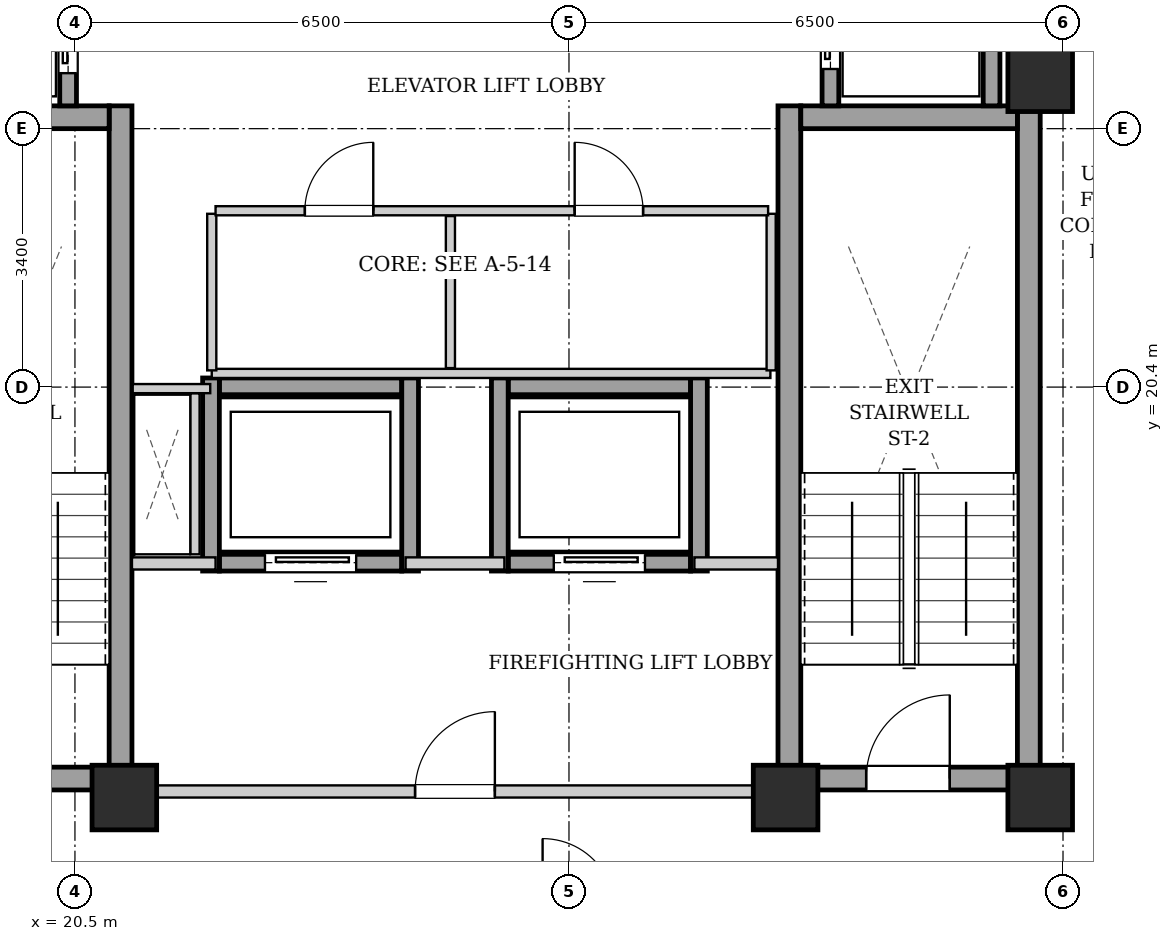
"""IFC4 building model, lengths in metres.
Left out: names, types, materials, properties, quantities, classifications, styles, units other than length and angle.
Written with IfcOpenShell. Run it as: python <this file> out.ifc"""

import sys

from ifc_helpers import new_model, si_unit, direction, frame, frame_2d, origin, origin_2d, place, context, subcontext, project, spatial, rectangle, extrude, element, fill, save


model = new_model("IFC4")
c1 = context("Model", 3, precision=1e-05, world=origin(), true_north=direction((0.0, 1.0)))
c2 = subcontext(c1, "Body", "Model", "MODEL_VIEW")
j1 = project(units=[si_unit("LENGTHUNIT", "METRE"), si_unit("PLANEANGLEUNIT", "RADIAN")], contexts=[c1])
p1 = place(None, origin())
s1 = spatial("IfcSite", under=j1, at=p1, CompositionType="ELEMENT")
p2 = place(p1, origin())
s2 = spatial("IfcBuilding", under=s1, at=p2, CompositionType="ELEMENT")
p3 = place(p2, frame((0.0, 0.0, 210.7)))
s3 = spatial("IfcBuildingStorey", under=s2, at=p3, CompositionType="ELEMENT", Elevation=210.7)
for number, where, z_axis, x_axis in (
    (1, (21.15, 15.0, 0.0), (0.0, 0.0, 1.0), (1.0, 0.0, 0.0)),
    (2, (29.85, 15.0, 0.0), (0.0, 0.0, 1.0), (1.0, 0.0, 0.0)),
    (3, (33.2, 15.0, 0.0), (0.0, 0.0, 1.0), (1.0, 0.0, 0.0)),
    (4, (33.2, 24.45, 0.0), (0.0, 0.0, 1.0), (1.0, 0.0, 0.0)),
):
    element("IfcColumn", number, at=place(p3, frame(where, z_axis=z_axis, x_axis=x_axis)), inside=s3, PredefinedType="COLUMN", context=c2, shape_type="SweptSolid", body=[
        extrude(rectangle(XDim=0.85, YDim=0.85, at=origin_2d()), origin(), (0.0, 0.0, 1.0), 3.3),
    ])
p4 = place(p3, frame((21.1, 15.1, 0.0), z_axis=(0.0, 0.0, 1.0), x_axis=(0.0, 1.0, 0.0)))
e5 = element("IfcWall", 5, at=p4, inside=s3, PredefinedType="SHEAR", context=c2, shape_type="SweptSolid", body=[
    extrude(rectangle(XDim=9.0, YDim=0.3, at=frame_2d((4.5, 0.0))), origin(), (0.0, 0.0, 1.0), 3.04),
])
p5 = place(p3, frame((18.1, 23.95, 0.0), z_axis=(0.0, 0.0, 1.0), x_axis=(1.0, 0.0, 0.0)))
e6 = element("IfcWall", 6, at=p5, inside=s3, PredefinedType="SHEAR", context=c2, shape_type="SweptSolid", body=[
    extrude(rectangle(XDim=2.85, YDim=0.3, at=frame_2d((1.425, 0.0))), origin(), (0.0, 0.0, 1.0), 3.04),
])
p6 = place(p3, frame((18.1, 15.25, 0.0), z_axis=(0.0, 0.0, 1.0), x_axis=(1.0, 0.0, 0.0)))
e7 = element("IfcWall", 7, at=p6, inside=s3, PredefinedType="SHEAR", context=c2, shape_type="SweptSolid", body=[
    extrude(rectangle(XDim=2.85, YDim=0.3, at=frame_2d((1.425, 0.0))), origin(), (0.0, 0.0, 1.0), 3.04),
])
p7 = place(p6, frame((0.86, 0.0, 0.0)))
e8 = element("IfcOpeningElement", 8, at=p7, cuts=e7, PredefinedType="OPENING", context=c2, shape_type="SweptSolid", body=[
    extrude(rectangle(XDim=1.1, YDim=2.05, at=frame_2d((0.55, 1.025))), frame((0.0, 0.16, 0.0), z_axis=(0.0, -1.0, 0.0), x_axis=(1.0, 0.0, 0.0)), (0.0, 0.0, 1.0), 0.32),
])
for number, where, z_axis, x_axis in (
    (9, (29.9, 15.1, 0.0), (0.0, 0.0, 1.0), (0.0, 1.0, 0.0)),
    (10, (33.05, 15.1, 0.0), (0.0, 0.0, 1.0), (0.0, 1.0, 0.0)),
):
    element("IfcWall", number, at=place(p3, frame(where, z_axis=z_axis, x_axis=x_axis)), inside=s3, PredefinedType="SHEAR", context=c2, shape_type="SweptSolid", body=[
        extrude(rectangle(XDim=9.0, YDim=0.3, at=frame_2d((4.5, 0.0))), origin(), (0.0, 0.0, 1.0), 3.04),
    ])
p8 = place(p3, frame((30.05, 23.95, 0.0), z_axis=(0.0, 0.0, 1.0), x_axis=(1.0, 0.0, 0.0)))
e11 = element("IfcWall", 11, at=p8, inside=s3, PredefinedType="SHEAR", context=c2, shape_type="SweptSolid", body=[
    extrude(rectangle(XDim=2.85, YDim=0.3, at=frame_2d((1.425, 0.0))), origin(), (0.0, 0.0, 1.0), 3.04),
])
p9 = place(p3, frame((30.05, 15.25, 0.0), z_axis=(0.0, 0.0, 1.0), x_axis=(1.0, 0.0, 0.0)))
e12 = element("IfcWall", 12, at=p9, inside=s3, PredefinedType="SHEAR", context=c2, shape_type="SweptSolid", body=[
    extrude(rectangle(XDim=2.85, YDim=0.3, at=frame_2d((1.425, 0.0))), origin(), (0.0, 0.0, 1.0), 3.04),
])
p10 = place(p9, frame((0.86, 0.0, 0.0)))
e13 = element("IfcOpeningElement", 13, at=p10, cuts=e12, PredefinedType="OPENING", context=c2, shape_type="SweptSolid", body=[
    extrude(rectangle(XDim=1.1, YDim=2.05, at=frame_2d((0.55, 1.025))), frame((0.0, 0.16, 0.0), z_axis=(0.0, -1.0, 0.0), x_axis=(1.0, 0.0, 0.0)), (0.0, 0.0, 1.0), 0.32),
])
p11 = place(p3, frame((20.41, 24.1, 0.0), z_axis=(0.0, 0.0, 1.0), x_axis=(0.0, 1.0, 0.0)))
e14 = element("IfcWall", 14, at=p11, inside=s3, PredefinedType="SHEAR", context=c2, shape_type="SweptSolid", body=[
    extrude(rectangle(XDim=1.96, YDim=0.22, at=frame_2d((0.98, 0.0))), origin(), (0.0, 0.0, 1.0), 3.04),
])
p12 = place(p11, frame((0.43, 0.0, 0.0)))
e15 = element("IfcOpeningElement", 15, at=p12, cuts=e14, PredefinedType="OPENING", context=c2, shape_type="SweptSolid", body=[
    extrude(rectangle(XDim=1.1, YDim=2.15, at=frame_2d((0.55, 1.075))), frame((0.0, 0.12, 0.0), z_axis=(0.0, -1.0, 0.0), x_axis=(1.0, 0.0, 0.0)), (0.0, 0.0, 1.0), 0.24),
])
p13 = place(p3, frame((30.44, 24.1, 0.0), z_axis=(0.0, 0.0, 1.0), x_axis=(0.0, 1.0, 0.0)))
e16 = element("IfcWall", 16, at=p13, inside=s3, PredefinedType="SHEAR", context=c2, shape_type="SweptSolid", body=[
    extrude(rectangle(XDim=2.07, YDim=0.22, at=frame_2d((1.035, 0.0))), origin(), (0.0, 0.0, 1.0), 3.04),
])
p14 = place(p13, frame((0.485, 0.0, 0.0)))
e17 = element("IfcOpeningElement", 17, at=p14, cuts=e16, PredefinedType="OPENING", context=c2, shape_type="SweptSolid", body=[
    extrude(rectangle(XDim=1.1, YDim=2.15, at=frame_2d((0.55, 1.075))), frame((0.0, 0.12, 0.0), z_axis=(0.0, -1.0, 0.0), x_axis=(1.0, 0.0, 0.0)), (0.0, 0.0, 1.0), 0.24),
])
p15 = place(p3, frame((32.56, 24.1, 0.0), z_axis=(0.0, 0.0, 1.0), x_axis=(0.0, 1.0, 0.0)))
e18 = element("IfcWall", 18, at=p15, inside=s3, PredefinedType="SHEAR", context=c2, shape_type="SweptSolid", body=[
    extrude(rectangle(XDim=2.07, YDim=0.22, at=frame_2d((1.035, 0.0))), origin(), (0.0, 0.0, 1.0), 3.04),
])
p16 = place(p3, frame((22.4, 18.09, 0.0), z_axis=(0.0, 0.0, 1.0), x_axis=(1.0, 0.0, 0.0)))
e19 = element("IfcWall", 19, at=p16, inside=s3, PredefinedType="SHEAR", context=c2, shape_type="SweptSolid", body=[
    extrude(rectangle(XDim=2.4, YDim=0.22, at=frame_2d((1.2, 0.0))), origin(), (0.0, 0.0, 1.0), 3.04),
])
p17 = place(p16, frame((0.6, 0.0, 0.0)))
e20 = element("IfcOpeningElement", 20, at=p17, cuts=e19, PredefinedType="OPENING", context=c2, shape_type="SweptSolid", body=[
    extrude(rectangle(XDim=1.2, YDim=2.15, at=frame_2d((0.6, 1.075))), frame((0.0, 0.12, 0.0), z_axis=(0.0, -1.0, 0.0), x_axis=(1.0, 0.0, 0.0)), (0.0, 0.0, 1.0), 0.24),
])
p18 = place(p3, frame((22.4, 20.41, 0.0), z_axis=(0.0, 0.0, 1.0), x_axis=(1.0, 0.0, 0.0)))
e21 = element("IfcWall", 21, at=p18, inside=s3, PredefinedType="SHEAR", context=c2, shape_type="SweptSolid", body=[
    extrude(rectangle(XDim=2.4, YDim=0.22, at=frame_2d((1.2, 0.0))), origin(), (0.0, 0.0, 1.0), 3.04),
])
for number, where, z_axis, x_axis in (
    (22, (22.29, 17.98, 0.0), (0.0, 0.0, 1.0), (0.0, 1.0, 0.0)),
    (23, (24.91, 17.98, 0.0), (0.0, 0.0, 1.0), (0.0, 1.0, 0.0)),
):
    element("IfcWall", number, at=place(p3, frame(where, z_axis=z_axis, x_axis=x_axis)), inside=s3, PredefinedType="SHEAR", context=c2, shape_type="SweptSolid", body=[
        extrude(rectangle(XDim=2.54, YDim=0.22, at=frame_2d((1.27, 0.0))), origin(), (0.0, 0.0, 1.0), 3.04),
    ])
p19 = place(p3, frame((26.2, 18.09, 0.0), z_axis=(0.0, 0.0, 1.0), x_axis=(1.0, 0.0, 0.0)))
e24 = element("IfcWall", 24, at=p19, inside=s3, PredefinedType="SHEAR", context=c2, shape_type="SweptSolid", body=[
    extrude(rectangle(XDim=2.4, YDim=0.22, at=frame_2d((1.2, 0.0))), origin(), (0.0, 0.0, 1.0), 3.04),
])
p20 = place(p19, frame((0.6, 0.0, 0.0)))
e25 = element("IfcOpeningElement", 25, at=p20, cuts=e24, PredefinedType="OPENING", context=c2, shape_type="SweptSolid", body=[
    extrude(rectangle(XDim=1.2, YDim=2.15, at=frame_2d((0.6, 1.075))), frame((0.0, 0.12, 0.0), z_axis=(0.0, -1.0, 0.0), x_axis=(1.0, 0.0, 0.0)), (0.0, 0.0, 1.0), 0.24),
])
p21 = place(p3, frame((26.2, 20.41, 0.0), z_axis=(0.0, 0.0, 1.0), x_axis=(1.0, 0.0, 0.0)))
e26 = element("IfcWall", 26, at=p21, inside=s3, PredefinedType="SHEAR", context=c2, shape_type="SweptSolid", body=[
    extrude(rectangle(XDim=2.4, YDim=0.22, at=frame_2d((1.2, 0.0))), origin(), (0.0, 0.0, 1.0), 3.04),
])
for number, where, z_axis, x_axis in (
    (27, (26.09, 17.98, 0.0), (0.0, 0.0, 1.0), (0.0, 1.0, 0.0)),
    (28, (28.71, 17.98, 0.0), (0.0, 0.0, 1.0), (0.0, 1.0, 0.0)),
):
    element("IfcWall", number, at=place(p3, frame(where, z_axis=z_axis, x_axis=x_axis)), inside=s3, PredefinedType="SHEAR", context=c2, shape_type="SweptSolid", body=[
        extrude(rectangle(XDim=2.54, YDim=0.22, at=frame_2d((1.27, 0.0))), origin(), (0.0, 0.0, 1.0), 3.04),
    ])
p22 = place(p3, frame((21.25, 15.08, 0.0), z_axis=(0.0, 0.0, 1.0), x_axis=(1.0, 0.0, 0.0)))
e29 = element("IfcWall", 29, at=p22, inside=s3, PredefinedType="PARTITIONING", context=c2, shape_type="SweptSolid", body=[
    extrude(rectangle(XDim=8.5, YDim=0.16, at=frame_2d((4.25, 0.0))), origin(), (0.0, 0.0, 1.0), 2.556),
])
p23 = place(p22, frame((3.725, 0.0, 0.0)))
e30 = element("IfcOpeningElement", 30, at=p23, cuts=e29, PredefinedType="OPENING", context=c2, shape_type="SweptSolid", body=[
    extrude(rectangle(XDim=1.05, YDim=2.05, at=frame_2d((0.525, 1.025))), frame((0.0, 0.09, 0.0), z_axis=(0.0, -1.0, 0.0), x_axis=(1.0, 0.0, 0.0)), (0.0, 0.0, 1.0), 0.18),
])
p24 = place(p3, frame((21.25, 18.08, 0.0), z_axis=(0.0, 0.0, 1.0), x_axis=(1.0, 0.0, 0.0)))
e31 = element("IfcWall", 31, at=p24, inside=s3, PredefinedType="PARTITIONING", context=c2, shape_type="SweptSolid", body=[
    extrude(rectangle(XDim=1.1, YDim=0.16, at=frame_2d((0.55, 0.0))), origin(), (0.0, 0.0, 1.0), 3.04),
])
p25 = place(p3, frame((24.85, 18.08, 0.0), z_axis=(0.0, 0.0, 1.0), x_axis=(1.0, 0.0, 0.0)))
e32 = element("IfcWall", 32, at=p25, inside=s3, PredefinedType="PARTITIONING", context=c2, shape_type="SweptSolid", body=[
    extrude(rectangle(XDim=1.3, YDim=0.16, at=frame_2d((0.65, 0.0))), origin(), (0.0, 0.0, 1.0), 3.04),
])
p26 = place(p3, frame((28.65, 18.08, 0.0), z_axis=(0.0, 0.0, 1.0), x_axis=(1.0, 0.0, 0.0)))
e33 = element("IfcWall", 33, at=p26, inside=s3, PredefinedType="PARTITIONING", context=c2, shape_type="SweptSolid", body=[
    extrude(rectangle(XDim=1.1, YDim=0.16, at=frame_2d((0.55, 0.0))), origin(), (0.0, 0.0, 1.0), 3.04),
])
p27 = place(p3, frame((33.12, 24.12, 0.0), z_axis=(0.0, 0.0, 1.0), x_axis=(0.0, 1.0, 0.0)))
e34 = element("IfcWall", 34, at=p27, inside=s3, PredefinedType="PARTITIONING", context=c2, shape_type="SweptSolid", body=[
    extrude(rectangle(XDim=4.76, YDim=0.16, at=frame_2d((2.38, 0.0))), origin(), (0.0, 0.0, 1.0), 3.04),
])
p28 = place(p3, frame((22.08, 18.2, 0.0), z_axis=(0.0, 0.0, 1.0), x_axis=(0.0, 1.0, 0.0)))
e35 = element("IfcWall", 35, at=p28, inside=s3, PredefinedType="PARTITIONING", context=c2, shape_type="SweptSolid", body=[
    extrude(rectangle(XDim=2.12, YDim=0.12, at=frame_2d((1.06, 0.0))), origin(), (0.0, 0.0, 1.0), 3.04),
])
p29 = place(p3, frame((22.28, 20.38, 0.0), z_axis=(0.0, 0.0, 1.0), x_axis=(-1.0, 0.0, 0.0)))
e36 = element("IfcWall", 36, at=p29, inside=s3, PredefinedType="PARTITIONING", context=c2, shape_type="SweptSolid", body=[
    extrude(rectangle(XDim=1.02, YDim=0.12, at=frame_2d((0.51, 0.0))), origin(), (0.0, 0.0, 1.0), 3.04),
])
p30 = place(p3, frame((22.3, 20.58, 0.0), z_axis=(0.0, 0.0, 1.0), x_axis=(1.0, 0.0, 0.0)))
e37 = element("IfcWall", 37, at=p30, inside=s3, PredefinedType="PARTITIONING", context=c2, shape_type="SweptSolid", body=[
    extrude(rectangle(XDim=7.35, YDim=0.12, at=frame_2d((3.675, 0.0))), origin(), (0.0, 0.0, 1.0), 3.04),
])
for number, where, z_axis, x_axis in (
    (38, (22.3, 20.62, 0.0), (0.0, 0.0, 1.0), (0.0, 1.0, 0.0)),
    (39, (29.66, 20.62, 0.0), (0.0, 0.0, 1.0), (0.0, 1.0, 0.0)),
):
    element("IfcWall", number, at=place(p3, frame(where, z_axis=z_axis, x_axis=x_axis)), inside=s3, PredefinedType="PARTITIONING", context=c2, shape_type="SweptSolid", body=[
        extrude(rectangle(XDim=2.06, YDim=0.12, at=frame_2d((1.03, 0.0))), origin(), (0.0, 0.0, 1.0), 3.04),
    ])
p31 = place(p3, frame((25.44, 20.65, 0.0), z_axis=(0.0, 0.0, 1.0), x_axis=(0.0, 1.0, 0.0)))
e40 = element("IfcWall", 40, at=p31, inside=s3, PredefinedType="PARTITIONING", context=c2, shape_type="SweptSolid", body=[
    extrude(rectangle(XDim=2.0, YDim=0.12, at=frame_2d((1.0, 0.0))), origin(), (0.0, 0.0, 1.0), 3.04),
])
p32 = place(p3, frame((22.35, 22.72, 0.0), z_axis=(0.0, 0.0, 1.0), x_axis=(1.0, 0.0, 0.0)))
e41 = element("IfcWall", 41, at=p32, inside=s3, PredefinedType="PARTITIONING", context=c2, shape_type="SweptSolid", body=[
    extrude(rectangle(XDim=7.27, YDim=0.12, at=frame_2d((3.635, 0.0))), origin(), (0.0, 0.0, 1.0), 3.04),
])
p33 = place(p32, frame((1.175, 0.0, 0.0)))
e42 = element("IfcOpeningElement", 42, at=p33, cuts=e41, PredefinedType="OPENING", context=c2, shape_type="SweptSolid", body=[
    extrude(rectangle(XDim=0.9, YDim=2.05, at=frame_2d((0.45, 1.025))), frame((0.0, 0.07, 0.0), z_axis=(0.0, -1.0, 0.0), x_axis=(1.0, 0.0, 0.0)), (0.0, 0.0, 1.0), 0.14),
])
p34 = place(p32, frame((4.725, 0.0, 0.0)))
e43 = element("IfcOpeningElement", 43, at=p34, cuts=e41, PredefinedType="OPENING", context=c2, shape_type="SweptSolid", body=[
    extrude(rectangle(XDim=0.9, YDim=2.05, at=frame_2d((0.45, 1.025))), frame((0.0, 0.07, 0.0), z_axis=(0.0, -1.0, 0.0), x_axis=(1.0, 0.0, 0.0)), (0.0, 0.0, 1.0), 0.14),
])
p35 = place(p10, origin())
e44 = element("IfcDoor", 44, at=p35, inside=s3, OperationType="SINGLE_SWING_RIGHT", PredefinedType="DOOR", context=c2, shape_type="SweptSolid", body=[
    extrude(rectangle(XDim=1.1, YDim=2.05, at=frame_2d((0.55, 1.025))), frame((0.0, 0.025, 0.0), z_axis=(0.0, -1.0, 0.0), x_axis=(1.0, 0.0, 0.0)), (0.0, 0.0, 1.0), 0.05),
])
fill(e13, e44)
p36 = place(p12, origin())
e45 = element("IfcDoor", 45, at=p36, inside=s3, OperationType="SLIDING_TO_LEFT", PredefinedType="DOOR", context=c2, shape_type="SweptSolid", body=[
    extrude(rectangle(XDim=1.1, YDim=2.15, at=frame_2d((0.55, 1.075))), frame((0.0, 0.025, 0.0), z_axis=(0.0, -1.0, 0.0), x_axis=(1.0, 0.0, 0.0)), (0.0, 0.0, 1.0), 0.05),
])
fill(e15, e45)
p37 = place(p14, origin())
e46 = element("IfcDoor", 46, at=p37, inside=s3, OperationType="SLIDING_TO_LEFT", PredefinedType="DOOR", context=c2, shape_type="SweptSolid", body=[
    extrude(rectangle(XDim=1.1, YDim=2.15, at=frame_2d((0.55, 1.075))), frame((0.0, 0.025, 0.0), z_axis=(0.0, -1.0, 0.0), x_axis=(1.0, 0.0, 0.0)), (0.0, 0.0, 1.0), 0.05),
])
fill(e17, e46)
p38 = place(p17, origin())
e47 = element("IfcDoor", 47, at=p38, inside=s3, OperationType="SLIDING_TO_LEFT", PredefinedType="DOOR", context=c2, shape_type="SweptSolid", body=[
    extrude(rectangle(XDim=1.2, YDim=2.15, at=frame_2d((0.6, 1.075))), frame((0.0, 0.025, 0.0), z_axis=(0.0, -1.0, 0.0), x_axis=(1.0, 0.0, 0.0)), (0.0, 0.0, 1.0), 0.05),
])
fill(e20, e47)
p39 = place(p20, origin())
e48 = element("IfcDoor", 48, at=p39, inside=s3, OperationType="SLIDING_TO_LEFT", PredefinedType="DOOR", context=c2, shape_type="SweptSolid", body=[
    extrude(rectangle(XDim=1.2, YDim=2.15, at=frame_2d((0.6, 1.075))), frame((0.0, 0.025, 0.0), z_axis=(0.0, -1.0, 0.0), x_axis=(1.0, 0.0, 0.0)), (0.0, 0.0, 1.0), 0.05),
])
fill(e25, e48)
p40 = place(p23, origin())
e49 = element("IfcDoor", 49, at=p40, inside=s3, OperationType="SINGLE_SWING_RIGHT", PredefinedType="DOOR", context=c2, shape_type="SweptSolid", body=[
    extrude(rectangle(XDim=1.05, YDim=2.05, at=frame_2d((0.525, 1.025))), frame((0.0, 0.025, 0.0), z_axis=(0.0, -1.0, 0.0), x_axis=(1.0, 0.0, 0.0)), (0.0, 0.0, 1.0), 0.05),
])
fill(e30, e49)
p41 = place(p33, origin())
e50 = element("IfcDoor", 50, at=p41, inside=s3, OperationType="SINGLE_SWING_RIGHT", PredefinedType="DOOR", context=c2, shape_type="SweptSolid", body=[
    extrude(rectangle(XDim=0.9, YDim=2.05, at=frame_2d((0.45, 1.025))), frame((0.0, 0.025, 0.0), z_axis=(0.0, -1.0, 0.0), x_axis=(1.0, 0.0, 0.0)), (0.0, 0.0, 1.0), 0.05),
])
fill(e42, e50)
p42 = place(p34, origin())
e51 = element("IfcDoor", 51, at=p42, inside=s3, OperationType="SINGLE_SWING_LEFT", PredefinedType="DOOR", context=c2, shape_type="SweptSolid", body=[
    extrude(rectangle(XDim=0.9, YDim=2.05, at=frame_2d((0.45, 1.025))), frame((0.0, 0.025, 0.0), z_axis=(0.0, -1.0, 0.0), x_axis=(1.0, 0.0, 0.0)), (0.0, 0.0, 1.0), 0.05),
])
fill(e43, e51)
save(model, sys.argv[1])
